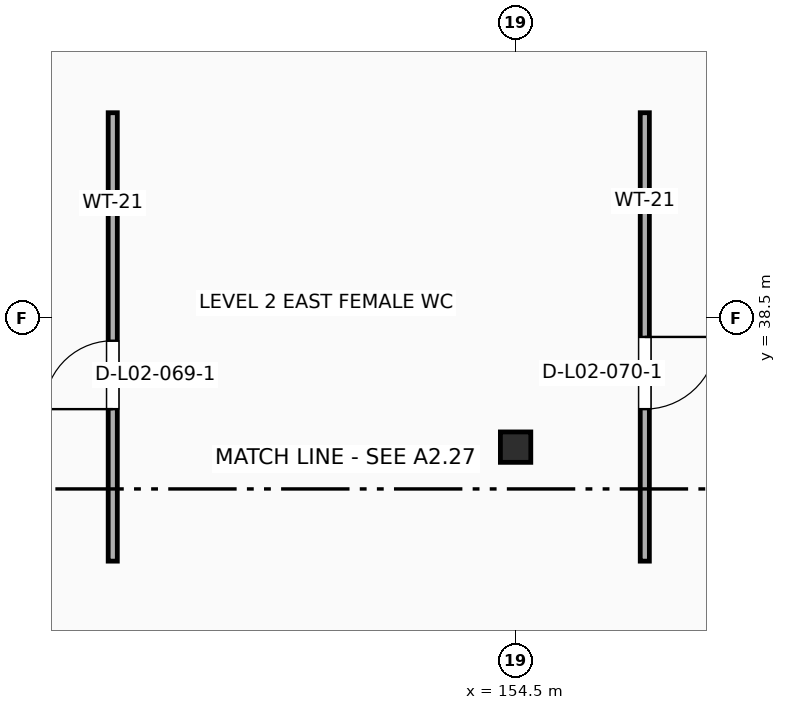
"""IFC4 building model, lengths in metres.
Left out: names, types, materials, properties, quantities, classifications, styles, units other than length and angle.
Written with IfcOpenShell. Run it as: python <this file> out.ifc"""

import sys

from ifc_helpers import new_model, si_unit, direction, frame, frame_2d, origin, origin_2d, place, context, subcontext, project, spatial, rectangle, hollow_rectangle, extrude, element, fill, save


model = new_model("IFC4")
c1 = context("Model", 3, precision=1e-05, world=origin(), true_north=direction((0.0, 1.0)))
c2 = subcontext(c1, "Body", "Model", "MODEL_VIEW")
j1 = project(units=[si_unit("LENGTHUNIT", "METRE"), si_unit("PLANEANGLEUNIT", "RADIAN")], contexts=[c1])
p1 = place(None, origin())
s1 = spatial("IfcSite", under=j1, at=p1, CompositionType="ELEMENT")
p2 = place(p1, origin())
s2 = spatial("IfcBuilding", under=s1, at=p2, CompositionType="ELEMENT")
p3 = place(p2, frame((0.0, 0.0, 10.2)))
s3 = spatial("IfcBuildingStorey", under=s2, at=p3, CompositionType="ELEMENT", Elevation=10.2)
p4 = place(p3, frame((154.5, 36.8, 0.0), z_axis=(0.0, 0.0, 1.0), x_axis=(1.0, 0.0, 0.0)))
e1 = element("IfcColumn", 1, at=p4, inside=s3, PredefinedType="COLUMN", context=c2, shape_type="SweptSolid", body=[
    extrude(hollow_rectangle(XDim=0.4, YDim=0.4, WallThickness=0.016, at=origin_2d()), origin(), (0.0, 0.0, 1.0), 4.54),
])
p5 = place(p3, frame((149.2, 35.3, 0.0), z_axis=(0.0, 0.0, 1.0), x_axis=(0.0, 1.0, 0.0)))
e2 = element("IfcWall", 2, at=p5, inside=s3, PredefinedType="PARTITIONING", context=c2, shape_type="SweptSolid", body=[
    extrude(rectangle(XDim=5.9, YDim=0.12, at=frame_2d((2.95, 0.0))), origin(), (0.0, 0.0, 1.0), 3.7),
])
p6 = place(p5, frame((2.0, 0.0, 0.0)))
e3 = element("IfcOpeningElement", 3, at=p6, cuts=e2, PredefinedType="OPENING", context=c2, shape_type="SweptSolid", body=[
    extrude(rectangle(XDim=0.9, YDim=2.15, at=frame_2d((0.45, 1.075))), frame((0.0, 0.072, 0.0), z_axis=(0.0, -1.0, 0.0), x_axis=(1.0, 0.0, 0.0)), (0.0, 0.0, 1.0), 0.144),
])
p7 = place(p3, frame((156.2, 35.3, 0.0), z_axis=(0.0, 0.0, 1.0), x_axis=(0.0, 1.0, 0.0)))
e4 = element("IfcWall", 4, at=p7, inside=s3, PredefinedType="PARTITIONING", context=c2, shape_type="SweptSolid", body=[
    extrude(rectangle(XDim=5.9, YDim=0.12, at=frame_2d((2.95, 0.0))), origin(), (0.0, 0.0, 1.0), 4.148),
])
p8 = place(p7, frame((2.0, 0.0, 0.0)))
e5 = element("IfcOpeningElement", 5, at=p8, cuts=e4, PredefinedType="OPENING", context=c2, shape_type="SweptSolid", body=[
    extrude(rectangle(XDim=0.95, YDim=2.15, at=frame_2d((0.475, 1.075))), frame((0.0, 0.072, 0.0), z_axis=(0.0, -1.0, 0.0), x_axis=(1.0, 0.0, 0.0)), (0.0, 0.0, 1.0), 0.144),
])
p9 = place(p6, origin())
e6 = element("IfcDoor", 6, at=p9, inside=s3, OperationType="SINGLE_SWING_LEFT", PredefinedType="DOOR", context=c2, shape_type="SweptSolid", body=[
    extrude(rectangle(XDim=0.9, YDim=2.15, at=frame_2d((0.45, 1.075))), frame((0.0, 0.025, 0.0), z_axis=(0.0, -1.0, 0.0), x_axis=(1.0, 0.0, 0.0)), (0.0, 0.0, 1.0), 0.05),
])
fill(e3, e6)
p10 = place(p8, frame((0.95, 0.0, 0.0), z_axis=(0.0, 0.0, 1.0), x_axis=(-1.0, 0.0, 0.0)))
e7 = element("IfcDoor", 7, at=p10, inside=s3, OperationType="SINGLE_SWING_RIGHT", PredefinedType="DOOR", context=c2, shape_type="SweptSolid", body=[
    extrude(rectangle(XDim=0.95, YDim=2.15, at=frame_2d((0.475, 1.075))), frame((0.0, 0.025, 0.0), z_axis=(0.0, -1.0, 0.0), x_axis=(1.0, 0.0, 0.0)), (0.0, 0.0, 1.0), 0.05),
])
fill(e5, e7)
save(model, sys.argv[1])
